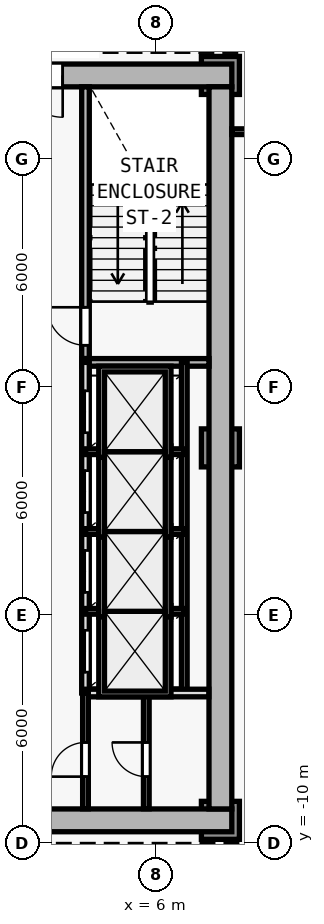
"""IFC4 building model, lengths in metres.
Left out: names, types, materials, properties, quantities, classifications, styles, units other than length and angle.
Written with IfcOpenShell. Run it as: python <this file> out.ifc"""

import sys

from ifc_helpers import new_model, si_unit, direction, frame, frame_2d, origin, origin_2d, place, context, subcontext, project, spatial, rectangle, extrude, element, fill, save


model = new_model("IFC4")
c1 = context("Model", 3, precision=1e-05, world=origin(), true_north=direction((0.0, 1.0)))
c2 = subcontext(c1, "Body", "Model", "MODEL_VIEW")
j1 = project(units=[si_unit("LENGTHUNIT", "METRE"), si_unit("PLANEANGLEUNIT", "RADIAN")], contexts=[c1])
p1 = place(None, origin())
s1 = spatial("IfcSite", under=j1, at=p1, CompositionType="ELEMENT")
p2 = place(p1, origin())
s2 = spatial("IfcBuilding", under=s1, at=p2, CompositionType="ELEMENT")
p3 = place(p2, frame((0.0, 0.0, 9.2)))
s3 = spatial("IfcBuildingStorey", under=s2, at=p3, CompositionType="ELEMENT", Elevation=9.2)
for number, where, z_axis, x_axis in (
    (1, (7.7, -9.4, 0.0), (0.0, 0.0, 1.0), (1.0, 0.0, 0.0)),
    (2, (7.7, 10.2, 0.0), (0.0, 0.0, 1.0), (1.0, 0.0, 0.0)),
    (3, (7.7, 0.4, 0.0), (0.0, 0.0, 1.0), (1.0, 0.0, 0.0)),
):
    element("IfcColumn", number, at=place(p3, frame(where, z_axis=z_axis, x_axis=x_axis)), inside=s3, PredefinedType="COLUMN", context=c2, shape_type="SweptSolid", body=[
        extrude(rectangle(XDim=1.0, YDim=1.0, at=origin_2d()), origin(), (0.0, 0.0, 1.0), 4.2),
    ])
p4 = place(p3, frame((-8.0, -9.4, 0.0), z_axis=(0.0, 0.0, 1.0), x_axis=(1.0, 0.0, 0.0)))
e4 = element("IfcWall", 4, at=p4, inside=s3, PredefinedType="SHEAR", context=c2, shape_type="SweptSolid", body=[
    extrude(rectangle(XDim=16.0, YDim=0.6, at=frame_2d((8.0, 0.0))), origin(), (0.0, 0.0, 1.0), 3.92),
])
p5 = place(p4, frame((9.65, 0.0, 0.0)))
e5 = element("IfcOpeningElement", 5, at=p5, cuts=e4, PredefinedType="OPENING", context=c2, shape_type="SweptSolid", body=[
    extrude(rectangle(XDim=1.5, YDim=2.2, at=frame_2d((0.75, 1.1))), frame((0.0, 0.31, 0.0), z_axis=(0.0, -1.0, 0.0), x_axis=(1.0, 0.0, 0.0)), (0.0, 0.0, 1.0), 0.62),
])
p6 = place(p3, frame((8.0, 10.2, 0.0), z_axis=(0.0, 0.0, 1.0), x_axis=(-1.0, 0.0, 0.0)))
e6 = element("IfcWall", 6, at=p6, inside=s3, PredefinedType="SHEAR", context=c2, shape_type="SweptSolid", body=[
    extrude(rectangle(XDim=16.0, YDim=0.6, at=frame_2d((8.0, 0.0))), origin(), (0.0, 0.0, 1.0), 3.92),
])
p7 = place(p6, frame((4.45, 0.0, 0.0)))
e7 = element("IfcOpeningElement", 7, at=p7, cuts=e6, PredefinedType="OPENING", context=c2, shape_type="SweptSolid", body=[
    extrude(rectangle(XDim=1.1, YDim=2.15, at=frame_2d((0.55, 1.075))), frame((0.0, 0.31, 0.0), z_axis=(0.0, -1.0, 0.0), x_axis=(1.0, 0.0, 0.0)), (0.0, 0.0, 1.0), 0.62),
])
p8 = place(p3, frame((7.7, 9.9, 0.0), z_axis=(0.0, 0.0, 1.0), x_axis=(0.0, -1.0, 0.0)))
e8 = element("IfcWall", 8, at=p8, inside=s3, PredefinedType="SHEAR", context=c2, shape_type="SweptSolid", body=[
    extrude(rectangle(XDim=19.0, YDim=0.6, at=frame_2d((9.5, 0.0))), origin(), (0.0, 0.0, 1.0), 3.92),
])
p9 = place(p3, frame((4.15, 2.75, 0.0), z_axis=(0.0, 0.0, 1.0), x_axis=(0.0, 1.0, 0.0)))
e9 = element("IfcWall", 9, at=p9, inside=s3, PredefinedType="SOLIDWALL", context=c2, shape_type="SweptSolid", body=[
    extrude(rectangle(XDim=7.15, YDim=0.2, at=frame_2d((3.575, 0.0))), origin(), (0.0, 0.0, 1.0), 3.92),
])
p10 = place(p9, frame((0.35, 0.0, 0.0)))
e10 = element("IfcOpeningElement", 10, at=p10, cuts=e9, PredefinedType="OPENING", context=c2, shape_type="SweptSolid", body=[
    extrude(rectangle(XDim=1.0, YDim=2.15, at=frame_2d((0.5, 1.075))), frame((0.0, 0.11, 0.0), z_axis=(0.0, -1.0, 0.0), x_axis=(1.0, 0.0, 0.0)), (0.0, 0.0, 1.0), 0.22),
])
p11 = place(p3, frame((4.05, 2.65, 0.0), z_axis=(0.0, 0.0, 1.0), x_axis=(1.0, 0.0, 0.0)))
e11 = element("IfcWall", 11, at=p11, inside=s3, PredefinedType="SOLIDWALL", context=c2, shape_type="SweptSolid", body=[
    extrude(rectangle(XDim=3.35, YDim=0.2, at=frame_2d((1.675, 0.0))), origin(), (0.0, 0.0, 1.0), 3.92),
])
p12 = place(p3, frame((4.15, -6.05, 0.0), z_axis=(0.0, 0.0, 1.0), x_axis=(0.0, 1.0, 0.0)))
e12 = element("IfcWall", 12, at=p12, inside=s3, PredefinedType="SOLIDWALL", context=c2, shape_type="SweptSolid", body=[
    extrude(rectangle(XDim=8.7, YDim=0.2, at=frame_2d((4.35, 0.0))), origin(), (0.0, 0.0, 1.0), 3.92),
])
p13 = place(p12, frame((0.55, 0.0, 0.0)))
e13 = element("IfcOpeningElement", 13, at=p13, cuts=e12, PredefinedType="OPENING", context=c2, shape_type="SweptSolid", body=[
    extrude(rectangle(XDim=1.1, YDim=2.15, at=frame_2d((0.55, 1.075))), frame((0.0, 0.11, 0.0), z_axis=(0.0, -1.0, 0.0), x_axis=(1.0, 0.0, 0.0)), (0.0, 0.0, 1.0), 0.22),
])
p14 = place(p12, frame((2.65, 0.0, 0.0)))
e14 = element("IfcOpeningElement", 14, at=p14, cuts=e12, PredefinedType="OPENING", context=c2, shape_type="SweptSolid", body=[
    extrude(rectangle(XDim=1.1, YDim=2.15, at=frame_2d((0.55, 1.075))), frame((0.0, 0.11, 0.0), z_axis=(0.0, -1.0, 0.0), x_axis=(1.0, 0.0, 0.0)), (0.0, 0.0, 1.0), 0.22),
])
p15 = place(p12, frame((4.75, 0.0, 0.0)))
e15 = element("IfcOpeningElement", 15, at=p15, cuts=e12, PredefinedType="OPENING", context=c2, shape_type="SweptSolid", body=[
    extrude(rectangle(XDim=1.1, YDim=2.15, at=frame_2d((0.55, 1.075))), frame((0.0, 0.11, 0.0), z_axis=(0.0, -1.0, 0.0), x_axis=(1.0, 0.0, 0.0)), (0.0, 0.0, 1.0), 0.22),
])
p16 = place(p12, frame((6.85, 0.0, 0.0)))
e16 = element("IfcOpeningElement", 16, at=p16, cuts=e12, PredefinedType="OPENING", context=c2, shape_type="SweptSolid", body=[
    extrude(rectangle(XDim=1.1, YDim=2.15, at=frame_2d((0.55, 1.075))), frame((0.0, 0.11, 0.0), z_axis=(0.0, -1.0, 0.0), x_axis=(1.0, 0.0, 0.0)), (0.0, 0.0, 1.0), 0.22),
])
p17 = place(p3, frame((6.75, -6.05, 0.0), z_axis=(0.0, 0.0, 1.0), x_axis=(0.0, 1.0, 0.0)))
e17 = element("IfcWall", 17, at=p17, inside=s3, PredefinedType="PARTITIONING", context=c2, shape_type="SweptSolid", body=[
    extrude(rectangle(XDim=8.7, YDim=0.15, at=frame_2d((4.35, 0.0))), origin(), (0.0, 0.0, 1.0), 3.92),
])
for number, where, z_axis, x_axis in (
    (18, (4.15, -3.9, 0.0), (0.0, 0.0, 1.0), (1.0, 0.0, 0.0)),
    (19, (4.15, -1.8, 0.0), (0.0, 0.0, 1.0), (1.0, 0.0, 0.0)),
    (20, (4.15, 0.3, 0.0), (0.0, 0.0, 1.0), (1.0, 0.0, 0.0)),
):
    element("IfcWall", number, at=place(p3, frame(where, z_axis=z_axis, x_axis=x_axis)), inside=s3, PredefinedType="PARTITIONING", context=c2, shape_type="SweptSolid", body=[
        extrude(rectangle(XDim=2.6, YDim=0.15, at=frame_2d((1.3, 0.0))), origin(), (0.0, 0.0, 1.0), 3.92),
    ])
p18 = place(p3, frame((4.15, -6.05, 0.0), z_axis=(0.0, 0.0, 1.0), x_axis=(1.0, 0.0, 0.0)))
e21 = element("IfcWall", 21, at=p18, inside=s3, PredefinedType="SOLIDWALL", context=c2, shape_type="SweptSolid", body=[
    extrude(rectangle(XDim=3.245, YDim=0.2, at=frame_2d((1.623, 0.0))), origin(), (0.0, 0.0, 1.0), 3.92),
])
p19 = place(p3, frame((4.15, -9.095, 0.0), z_axis=(0.0, 0.0, 1.0), x_axis=(0.0, 1.0, 0.0)))
e22 = element("IfcWall", 22, at=p19, inside=s3, PredefinedType="PARTITIONING", context=c2, shape_type="SweptSolid", body=[
    extrude(rectangle(XDim=3.045, YDim=0.15, at=frame_2d((1.522, 0.0))), origin(), (0.0, 0.0, 1.0), 3.92),
])
p20 = place(p19, frame((0.845, 0.0, 0.0)))
e23 = element("IfcOpeningElement", 23, at=p20, cuts=e22, PredefinedType="OPENING", context=c2, shape_type="SweptSolid", body=[
    extrude(rectangle(XDim=0.9, YDim=2.1, at=frame_2d((0.45, 1.05))), frame((0.0, 0.085, 0.0), z_axis=(0.0, -1.0, 0.0), x_axis=(1.0, 0.0, 0.0)), (0.0, 0.0, 1.0), 0.17),
])
p21 = place(p3, frame((5.75, -9.095, 0.0), z_axis=(0.0, 0.0, 1.0), x_axis=(0.0, 1.0, 0.0)))
e24 = element("IfcWall", 24, at=p21, inside=s3, PredefinedType="PARTITIONING", context=c2, shape_type="SweptSolid", body=[
    extrude(rectangle(XDim=3.045, YDim=0.15, at=frame_2d((1.522, 0.0))), origin(), (0.0, 0.0, 1.0), 3.92),
])
p22 = place(p21, frame((0.845, 0.0, 0.0)))
e25 = element("IfcOpeningElement", 25, at=p22, cuts=e24, PredefinedType="OPENING", context=c2, shape_type="SweptSolid", body=[
    extrude(rectangle(XDim=0.9, YDim=2.1, at=frame_2d((0.45, 1.05))), frame((0.0, 0.085, 0.0), z_axis=(0.0, -1.0, 0.0), x_axis=(1.0, 0.0, 0.0)), (0.0, 0.0, 1.0), 0.17),
])
p23 = place(p3, frame((8.0, 8.72, 0.0), z_axis=(0.0, 0.0, 1.0), x_axis=(1.0, 0.0, 0.0)))
e26 = element("IfcWall", 26, at=p23, inside=s3, PredefinedType="PARTITIONING", context=c2, shape_type="SweptSolid", body=[
    extrude(rectangle(XDim=12.4, YDim=0.15, at=frame_2d((6.2, 0.0))), origin(), (0.0, 0.0, 1.0), 3.92),
])
p24 = place(p7, origin())
e27 = element("IfcDoor", 27, at=p24, inside=s3, OperationType="SINGLE_SWING_LEFT", PredefinedType="DOOR", context=c2, shape_type="SweptSolid", body=[
    extrude(rectangle(XDim=1.1, YDim=2.15, at=frame_2d((0.55, 1.075))), frame((0.0, 0.025, 0.0), z_axis=(0.0, -1.0, 0.0), x_axis=(1.0, 0.0, 0.0)), (0.0, 0.0, 1.0), 0.05),
])
fill(e7, e27)
p25 = place(p10, origin())
e28 = element("IfcDoor", 28, at=p25, inside=s3, OperationType="SINGLE_SWING_RIGHT", PredefinedType="DOOR", context=c2, shape_type="SweptSolid", body=[
    extrude(rectangle(XDim=1.0, YDim=2.15, at=frame_2d((0.5, 1.075))), frame((0.0, 0.025, 0.0), z_axis=(0.0, -1.0, 0.0), x_axis=(1.0, 0.0, 0.0)), (0.0, 0.0, 1.0), 0.05),
])
fill(e10, e28)
p26 = place(p13, origin())
e29 = element("IfcDoor", 29, at=p26, inside=s3, OperationType="DOUBLE_DOOR_SLIDING", PredefinedType="DOOR", context=c2, shape_type="SweptSolid", body=[
    extrude(rectangle(XDim=1.1, YDim=2.15, at=frame_2d((0.55, 1.075))), frame((0.0, 0.025, 0.0), z_axis=(0.0, -1.0, 0.0), x_axis=(1.0, 0.0, 0.0)), (0.0, 0.0, 1.0), 0.05),
])
fill(e13, e29)
p27 = place(p14, origin())
e30 = element("IfcDoor", 30, at=p27, inside=s3, OperationType="DOUBLE_DOOR_SLIDING", PredefinedType="DOOR", context=c2, shape_type="SweptSolid", body=[
    extrude(rectangle(XDim=1.1, YDim=2.15, at=frame_2d((0.55, 1.075))), frame((0.0, 0.025, 0.0), z_axis=(0.0, -1.0, 0.0), x_axis=(1.0, 0.0, 0.0)), (0.0, 0.0, 1.0), 0.05),
])
fill(e14, e30)
p28 = place(p15, origin())
e31 = element("IfcDoor", 31, at=p28, inside=s3, OperationType="DOUBLE_DOOR_SLIDING", PredefinedType="DOOR", context=c2, shape_type="SweptSolid", body=[
    extrude(rectangle(XDim=1.1, YDim=2.15, at=frame_2d((0.55, 1.075))), frame((0.0, 0.025, 0.0), z_axis=(0.0, -1.0, 0.0), x_axis=(1.0, 0.0, 0.0)), (0.0, 0.0, 1.0), 0.05),
])
fill(e15, e31)
p29 = place(p16, origin())
e32 = element("IfcDoor", 32, at=p29, inside=s3, OperationType="DOUBLE_DOOR_SLIDING", PredefinedType="DOOR", context=c2, shape_type="SweptSolid", body=[
    extrude(rectangle(XDim=1.1, YDim=2.15, at=frame_2d((0.55, 1.075))), frame((0.0, 0.025, 0.0), z_axis=(0.0, -1.0, 0.0), x_axis=(1.0, 0.0, 0.0)), (0.0, 0.0, 1.0), 0.05),
])
fill(e16, e32)
p30 = place(p20, origin())
e33 = element("IfcDoor", 33, at=p30, inside=s3, OperationType="SINGLE_SWING_LEFT", PredefinedType="DOOR", context=c2, shape_type="SweptSolid", body=[
    extrude(rectangle(XDim=0.9, YDim=2.1, at=frame_2d((0.45, 1.05))), frame((0.0, 0.025, 0.0), z_axis=(0.0, -1.0, 0.0), x_axis=(1.0, 0.0, 0.0)), (0.0, 0.0, 1.0), 0.05),
])
fill(e23, e33)
p31 = place(p22, origin())
e34 = element("IfcDoor", 34, at=p31, inside=s3, OperationType="SINGLE_SWING_RIGHT", PredefinedType="DOOR", context=c2, shape_type="SweptSolid", body=[
    extrude(rectangle(XDim=0.9, YDim=2.1, at=frame_2d((0.45, 1.05))), frame((0.0, 0.025, 0.0), z_axis=(0.0, -1.0, 0.0), x_axis=(1.0, 0.0, 0.0)), (0.0, 0.0, 1.0), 0.05),
])
fill(e25, e34)
save(model, sys.argv[1])
